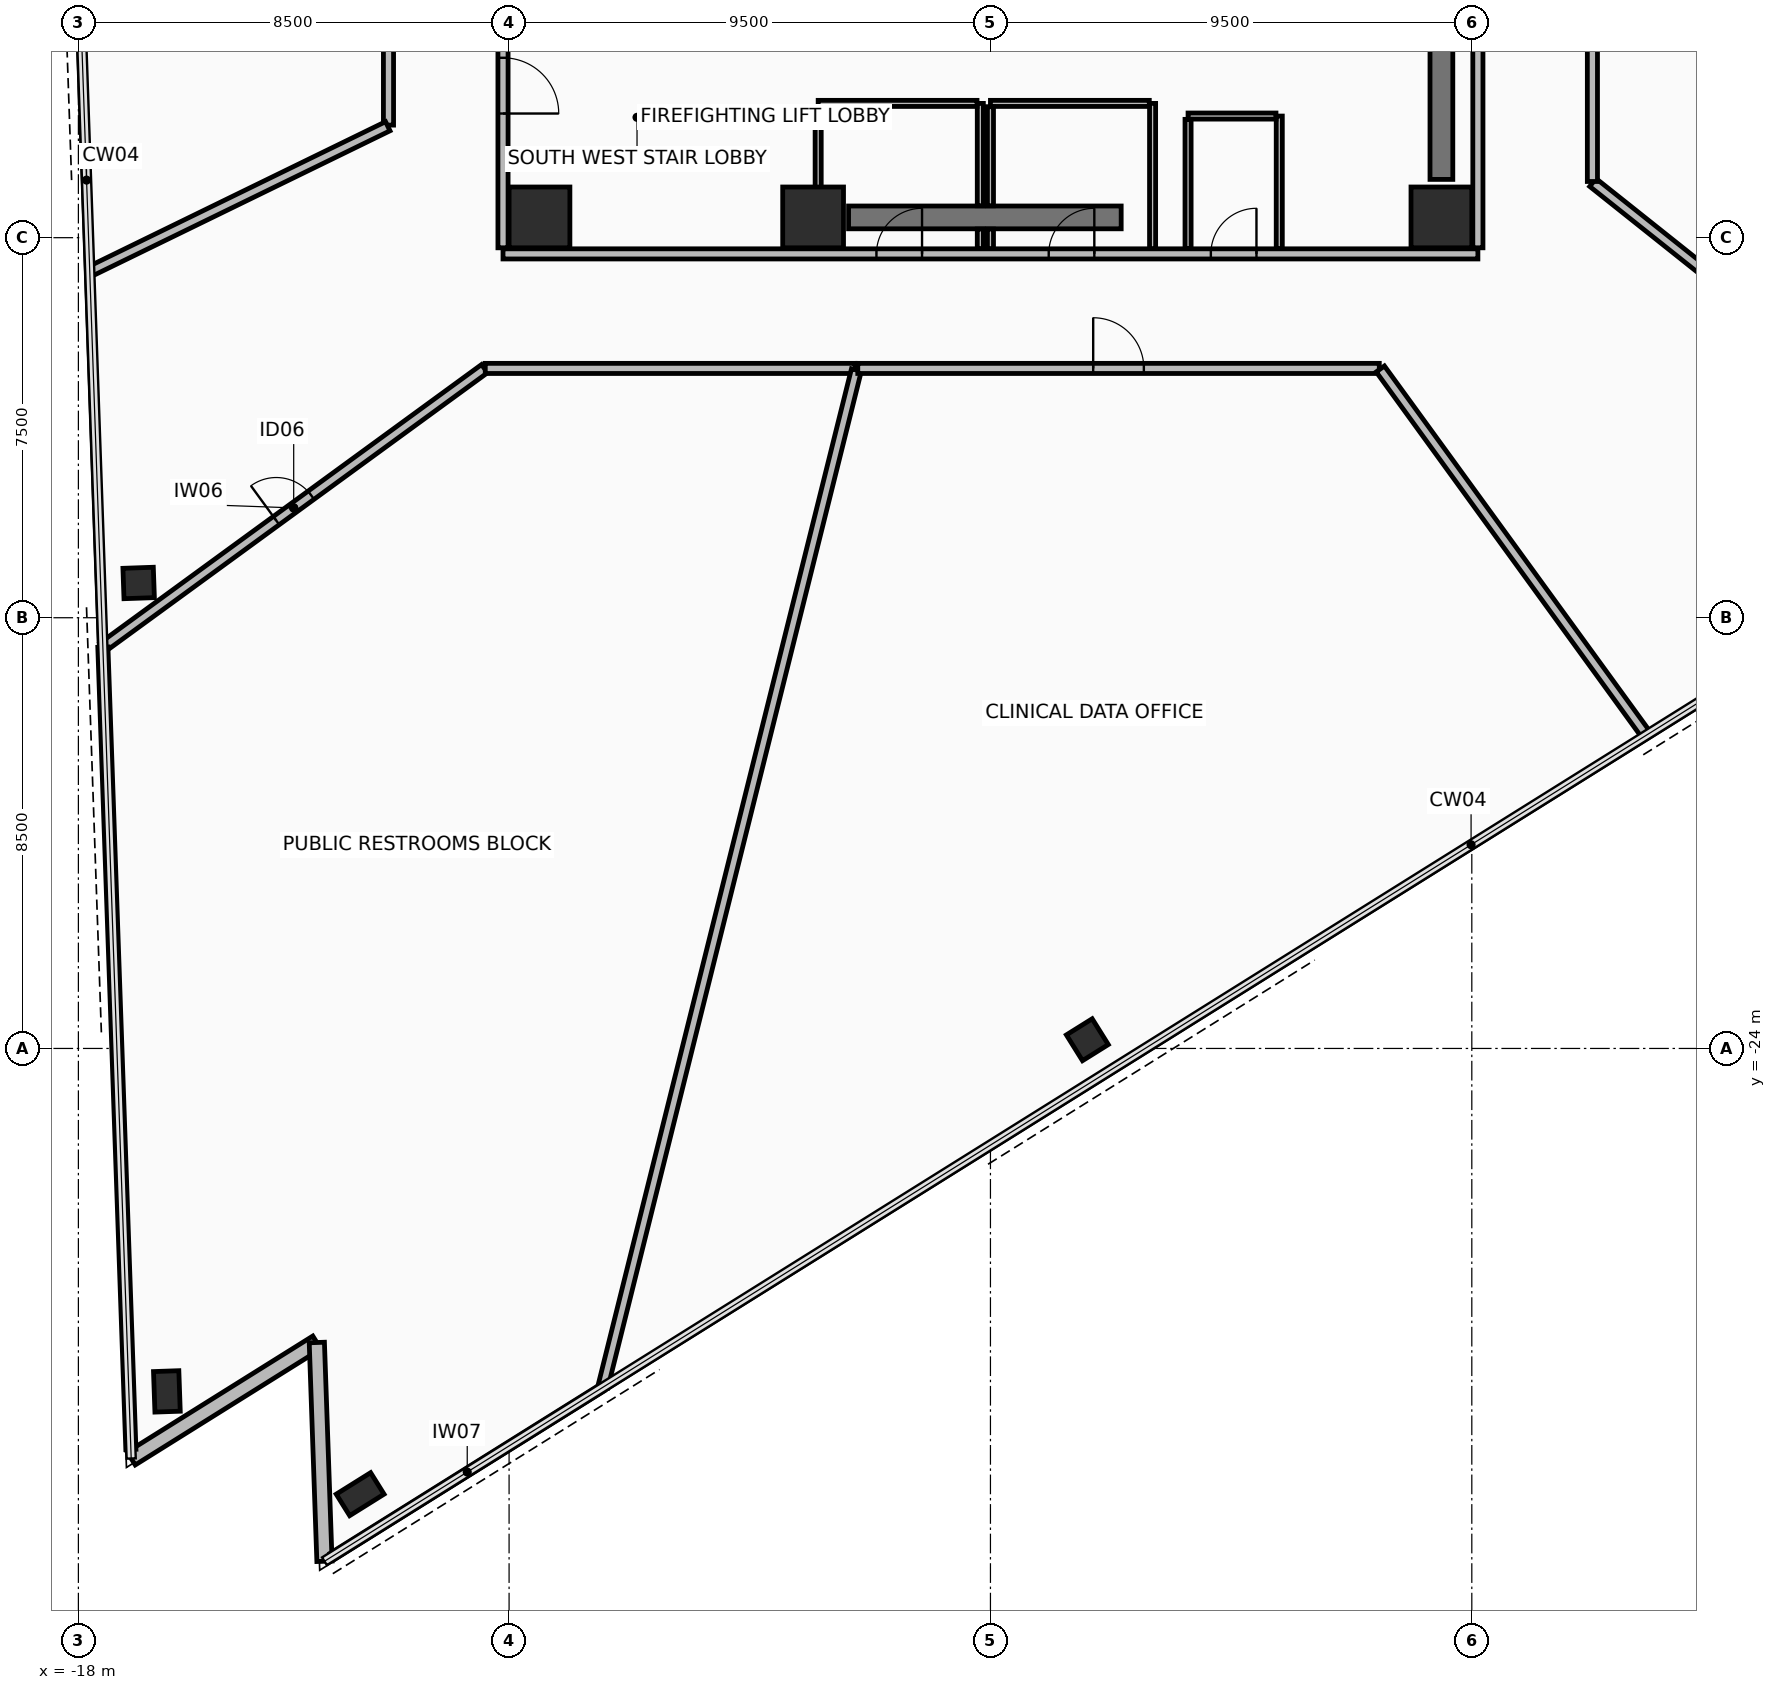
"""IFC4 building model, lengths in metres.
Left out: names, types, materials, properties, quantities, classifications, styles, units other than length and angle.
Written with IfcOpenShell. Run it as: python <this file> out.ifc"""

import sys

from ifc_helpers import new_model, si_unit, direction, frame, frame_2d, origin, origin_2d, place, context, subcontext, project, spatial, rectangle, hollow_rectangle, extrude, element, fill, save


model = new_model("IFC4")
c1 = context("Model", 3, precision=1e-05, world=origin(), true_north=direction((0.0, 1.0)))
c2 = subcontext(c1, "Body", "Model", "MODEL_VIEW")
j1 = project(units=[si_unit("LENGTHUNIT", "METRE"), si_unit("PLANEANGLEUNIT", "RADIAN")], contexts=[c1])
p1 = place(None, origin())
s1 = spatial("IfcSite", under=j1, at=p1, CompositionType="ELEMENT")
p2 = place(p1, origin())
s2 = spatial("IfcBuilding", under=s1, at=p2, CompositionType="ELEMENT")
p3 = place(p2, frame((0.0, 0.0, 156.8)))
s3 = spatial("IfcBuildingStorey", under=s2, at=p3, CompositionType="ELEMENT", Elevation=156.8)
for number, where, z_axis, x_axis in (
    (1, (-8.9, -7.6, 0.0), (0.0, 0.0, 1.0), (1.0, 0.0, 0.0)),
    (2, (-3.5, -7.6, 0.0), (0.0, 0.0, 1.0), (1.0, 0.0, 0.0)),
    (3, (8.9, -7.6, 0.0), (0.0, 0.0, 1.0), (1.0, 0.0, 0.0)),
):
    element("IfcColumn", number, at=place(p3, frame(where, z_axis=z_axis, x_axis=x_axis)), inside=s3, PredefinedType="COLUMN", context=c2, shape_type="SweptSolid", body=[
        extrude(rectangle(XDim=1.2, YDim=1.2, at=origin_2d()), origin(), (0.0, 0.0, 1.0), 3.6),
    ])
p4 = place(p3, frame((-16.811, -14.814, 0.0), z_axis=(0.0, 0.0, 1.0), x_axis=(-0.034899496703, 0.999390827019, 0.0)))
e4 = element("IfcColumn", 4, at=p4, inside=s3, PredefinedType="COLUMN", context=c2, shape_type="SweptSolid", body=[
    extrude(hollow_rectangle(XDim=0.6, YDim=0.6, WallThickness=0.036, at=origin_2d()), origin(), (0.0, 0.0, 1.0), 3.6),
])
for number, where, z_axis, x_axis in (
    (5, (-16.254, -30.768, 0.0), (0.0, 0.0, 1.0), (-0.035, 0.999, 0.0)),
    (6, (-12.439, -32.796, 0.0), (0.0, 0.0, 1.0), (0.848, 0.53, 0.0)),
):
    element("IfcColumn", number, at=place(p3, frame(where, z_axis=z_axis, x_axis=x_axis)), inside=s3, PredefinedType="COLUMN", context=c2, shape_type="SweptSolid", body=[
        extrude(hollow_rectangle(XDim=0.5, YDim=0.8, WallThickness=0.04, at=origin_2d()), origin(), (0.0, 0.0, 1.0), 3.6),
    ])
p5 = place(p3, frame((1.912, -23.828, 0.0), z_axis=(0.0, 0.0, 1.0), x_axis=(0.848047171272, 0.529920744356, 0.0)))
e7 = element("IfcColumn", 7, at=p5, inside=s3, PredefinedType="COLUMN", context=c2, shape_type="SweptSolid", body=[
    extrude(hollow_rectangle(XDim=0.6, YDim=0.6, WallThickness=0.036, at=origin_2d()), origin(), (0.0, 0.0, 1.0), 3.6),
])
p6 = place(p3, frame((-16.958, -32.092, 0.0), z_axis=(0.0, 0.0, 1.0), x_axis=(0.848068146975, 0.529887174866, 0.0)))
e8 = element("IfcWall", 8, at=p6, inside=s3, PredefinedType="STANDARD", context=c2, shape_type="SweptSolid", body=[
    extrude(rectangle(XDim=4.32, YDim=0.3, at=frame_2d((2.16, 0.0))), origin(), (0.0, 0.0, 1.0), 2.705),
])
p7 = place(p3, frame((-13.294, -29.803, 0.0), z_axis=(0.0, 0.0, 1.0), x_axis=(0.034869079132, -0.999391888761, 0.0)))
e9 = element("IfcWall", 9, at=p7, inside=s3, PredefinedType="STANDARD", context=c2, shape_type="SweptSolid", body=[
    extrude(rectangle(XDim=4.32, YDim=0.3, at=frame_2d((2.16, 0.0))), origin(), (0.0, 0.0, 1.0), 2.705),
])
p8 = place(p3, frame((-2.8, -7.6, 0.0), z_axis=(0.0, 0.0, 1.0), x_axis=(1.0, 0.0, 0.0)))
e10 = element("IfcWall", 10, at=p8, inside=s3, PredefinedType="SHEAR", context=c2, shape_type="SweptSolid", body=[
    extrude(rectangle(XDim=5.38, YDim=0.45, at=frame_2d((2.69, 0.0))), origin(), (0.0, 0.0, 1.0), 3.41),
])
p9 = place(p3, frame((8.9, -6.85, 0.0), z_axis=(0.0, 0.0, 1.0), x_axis=(0.0, 1.0, 0.0)))
e11 = element("IfcWall", 11, at=p9, inside=s3, PredefinedType="SHEAR", context=c2, shape_type="SweptSolid", body=[
    extrude(rectangle(XDim=10.7, YDim=0.45, at=frame_2d((5.35, 0.0))), origin(), (0.0, 0.0, 1.0), 3.41),
])
p10 = place(p3, frame((-9.62, -8.32, 0.0), z_axis=(0.0, 0.0, 1.0), x_axis=(1.0, 0.0, 0.0)))
e12 = element("IfcWall", 12, at=p10, inside=s3, PredefinedType="PARTITIONING", context=c2, shape_type="SweptSolid", body=[
    extrude(rectangle(XDim=19.24, YDim=0.2, at=frame_2d((9.62, 0.0))), origin(), (0.0, 0.0, 1.0), 2.855),
])
p11 = place(p10, frame((7.37, 0.0, 0.0)))
e13 = element("IfcOpeningElement", 13, at=p11, cuts=e12, PredefinedType="OPENING", context=c2, shape_type="SweptSolid", body=[
    extrude(rectangle(XDim=0.9, YDim=2.1, at=frame_2d((0.45, 1.05))), frame((0.0, 0.11, 0.0), z_axis=(0.0, -1.0, 0.0), x_axis=(1.0, 0.0, 0.0)), (0.0, 0.0, 1.0), 0.22),
])
p12 = place(p10, frame((10.77, 0.0, 0.0)))
e14 = element("IfcOpeningElement", 14, at=p12, cuts=e12, PredefinedType="OPENING", context=c2, shape_type="SweptSolid", body=[
    extrude(rectangle(XDim=0.9, YDim=2.1, at=frame_2d((0.45, 1.05))), frame((0.0, 0.11, 0.0), z_axis=(0.0, -1.0, 0.0), x_axis=(1.0, 0.0, 0.0)), (0.0, 0.0, 1.0), 0.22),
])
p13 = place(p10, frame((13.97, 0.0, 0.0)))
e15 = element("IfcOpeningElement", 15, at=p13, cuts=e12, PredefinedType="OPENING", context=c2, shape_type="SweptSolid", body=[
    extrude(rectangle(XDim=0.9, YDim=2.1, at=frame_2d((0.45, 1.05))), frame((0.0, 0.11, 0.0), z_axis=(0.0, -1.0, 0.0), x_axis=(1.0, 0.0, 0.0)), (0.0, 0.0, 1.0), 0.22),
])
p14 = place(p3, frame((-9.62, 8.2, 0.0), z_axis=(0.0, 0.0, 1.0), x_axis=(0.0, -1.0, 0.0)))
e16 = element("IfcWall", 16, at=p14, inside=s3, PredefinedType="PARTITIONING", context=c2, shape_type="SweptSolid", body=[
    extrude(rectangle(XDim=16.4, YDim=0.2, at=frame_2d((8.2, 0.0))), origin(), (0.0, 0.0, 1.0), 2.855),
])
p15 = place(p14, frame((12.65, 0.0, 0.0)))
e17 = element("IfcOpeningElement", 17, at=p15, cuts=e16, PredefinedType="OPENING", context=c2, shape_type="SweptSolid", body=[
    extrude(rectangle(XDim=1.1, YDim=2.15, at=frame_2d((0.55, 1.075))), frame((0.0, 0.11, 0.0), z_axis=(0.0, -1.0, 0.0), x_axis=(1.0, 0.0, 0.0)), (0.0, 0.0, 1.0), 0.22),
])
p16 = place(p3, frame((9.62, -8.2, 0.0), z_axis=(0.0, 0.0, 1.0), x_axis=(0.0, 1.0, 0.0)))
e18 = element("IfcWall", 18, at=p16, inside=s3, PredefinedType="PARTITIONING", context=c2, shape_type="SweptSolid", body=[
    extrude(rectangle(XDim=16.4, YDim=0.2, at=frame_2d((8.2, 0.0))), origin(), (0.0, 0.0, 1.0), 2.855),
])
p17 = place(p16, frame((12.65, 0.0, 0.0)))
e19 = element("IfcOpeningElement", 19, at=p17, cuts=e18, PredefinedType="OPENING", context=c2, shape_type="SweptSolid", body=[
    extrude(rectangle(XDim=1.1, YDim=2.15, at=frame_2d((0.55, 1.075))), frame((0.0, 0.11, 0.0), z_axis=(0.0, -1.0, 0.0), x_axis=(1.0, 0.0, 0.0)), (0.0, 0.0, 1.0), 0.22),
])
p18 = place(p3, frame((-0.2, -8.215, 0.0), z_axis=(0.0, 0.0, 1.0), x_axis=(0.0, 1.0, 0.0)))
e20 = element("IfcWall", 20, at=p18, inside=s3, PredefinedType="PARTITIONING", context=c2, shape_type="SweptSolid", body=[
    extrude(rectangle(XDim=0.385, YDim=0.12, at=frame_2d((0.192, 0.0))), origin(), (0.0, 0.0, 1.0), 2.605),
])
p19 = place(p3, frame((-0.2, -7.37, 0.0), z_axis=(0.0, 0.0, 1.0), x_axis=(0.0, 1.0, 0.0)))
e21 = element("IfcWall", 21, at=p19, inside=s3, PredefinedType="PARTITIONING", context=c2, shape_type="SweptSolid", body=[
    extrude(rectangle(XDim=2.02, YDim=0.12, at=frame_2d((1.01, 0.0))), origin(), (0.0, 0.0, 1.0), 2.605),
])
p20 = place(p3, frame((-0.265, -5.35, 0.0), z_axis=(0.0, 0.0, 1.0), x_axis=(-1.0, 0.0, 0.0)))
e22 = element("IfcWall", 22, at=p20, inside=s3, PredefinedType="PARTITIONING", context=c2, shape_type="SweptSolid", body=[
    extrude(rectangle(XDim=3.135, YDim=0.12, at=frame_2d((1.567, 0.0))), origin(), (0.0, 0.0, 1.0), 2.605),
])
p21 = place(p3, frame((-3.4, -5.415, 0.0), z_axis=(0.0, 0.0, 1.0), x_axis=(0.0, -1.0, 0.0)))
e23 = element("IfcWall", 23, at=p21, inside=s3, PredefinedType="PARTITIONING", context=c2, shape_type="SweptSolid", body=[
    extrude(rectangle(XDim=2.8, YDim=0.12, at=frame_2d((1.4, 0.0))), origin(), (0.0, 0.0, 1.0), 2.605),
])
p22 = place(p3, frame((3.2, -8.215, 0.0), z_axis=(0.0, 0.0, 1.0), x_axis=(0.0, 1.0, 0.0)))
e24 = element("IfcWall", 24, at=p22, inside=s3, PredefinedType="PARTITIONING", context=c2, shape_type="SweptSolid", body=[
    extrude(rectangle(XDim=2.865, YDim=0.12, at=frame_2d((1.433, 0.0))), origin(), (0.0, 0.0, 1.0), 2.605),
])
p23 = place(p3, frame((3.135, -5.35, 0.0), z_axis=(0.0, 0.0, 1.0), x_axis=(-1.0, 0.0, 0.0)))
e25 = element("IfcWall", 25, at=p23, inside=s3, PredefinedType="PARTITIONING", context=c2, shape_type="SweptSolid", body=[
    extrude(rectangle(XDim=3.135, YDim=0.12, at=frame_2d((1.567, 0.0))), origin(), (0.0, 0.0, 1.0), 3.41),
])
p24 = place(p3, frame((0.0, -5.415, 0.0), z_axis=(0.0, 0.0, 1.0), x_axis=(0.0, -1.0, 0.0)))
e26 = element("IfcWall", 26, at=p24, inside=s3, PredefinedType="PARTITIONING", context=c2, shape_type="SweptSolid", body=[
    extrude(rectangle(XDim=1.955, YDim=0.12, at=frame_2d((0.978, 0.0))), origin(), (0.0, 0.0, 1.0), 2.605),
])
p25 = place(p3, frame((0.0, -7.83, 0.0), z_axis=(0.0, 0.0, 1.0), x_axis=(0.0, -1.0, 0.0)))
e27 = element("IfcWall", 27, at=p25, inside=s3, PredefinedType="PARTITIONING", context=c2, shape_type="SweptSolid", body=[
    extrude(rectangle(XDim=0.385, YDim=0.12, at=frame_2d((0.192, 0.0))), origin(), (0.0, 0.0, 1.0), 2.605),
])
p26 = place(p3, frame((5.7, -8.215, 0.0), z_axis=(0.0, 0.0, 1.0), x_axis=(0.0, 1.0, 0.0)))
e28 = element("IfcWall", 28, at=p26, inside=s3, PredefinedType="PARTITIONING", context=c2, shape_type="SweptSolid", body=[
    extrude(rectangle(XDim=2.615, YDim=0.12, at=frame_2d((1.308, 0.0))), origin(), (0.0, 0.0, 1.0), 2.605),
])
p27 = place(p3, frame((5.635, -5.6, 0.0), z_axis=(0.0, 0.0, 1.0), x_axis=(-1.0, 0.0, 0.0)))
e29 = element("IfcWall", 29, at=p27, inside=s3, PredefinedType="PARTITIONING", context=c2, shape_type="SweptSolid", body=[
    extrude(rectangle(XDim=1.735, YDim=0.12, at=frame_2d((0.868, 0.0))), origin(), (0.0, 0.0, 1.0), 3.41),
])
p28 = place(p3, frame((3.9, -5.665, 0.0), z_axis=(0.0, 0.0, 1.0), x_axis=(0.0, -1.0, 0.0)))
e30 = element("IfcWall", 30, at=p28, inside=s3, PredefinedType="PARTITIONING", context=c2, shape_type="SweptSolid", body=[
    extrude(rectangle(XDim=2.55, YDim=0.12, at=frame_2d((1.275, 0.0))), origin(), (0.0, 0.0, 1.0), 2.605),
])
p29 = place(p3, frame((-17.517, -16.08, 0.0), z_axis=(0.0, 0.0, 1.0), x_axis=(0.807836100195, 0.58940718966, 0.0)))
e31 = element("IfcWall", 31, at=p29, inside=s3, PredefinedType="PARTITIONING", context=c2, shape_type="SweptSolid", body=[
    extrude(rectangle(XDim=9.324, YDim=0.2, at=frame_2d((4.662, 0.0))), origin(), (0.0, 0.0, 1.0), 2.705),
])
p30 = place(p29, frame((4.237, 0.0, 0.0)))
e32 = element("IfcOpeningElement", 32, at=p30, cuts=e31, PredefinedType="OPENING", context=c2, shape_type="SweptSolid", body=[
    extrude(rectangle(XDim=0.85, YDim=2.1, at=frame_2d((0.425, 1.05))), frame((0.0, 0.11, 0.0), z_axis=(0.0, -1.0, 0.0), x_axis=(1.0, 0.0, 0.0)), (0.0, 0.0, 1.0), 0.22),
])
p31 = place(p3, frame((-9.97, -10.58, 0.0), z_axis=(0.0, 0.0, 1.0), x_axis=(1.0, 0.0, 0.0)))
e33 = element("IfcWall", 33, at=p31, inside=s3, PredefinedType="PARTITIONING", context=c2, shape_type="SweptSolid", body=[
    extrude(rectangle(XDim=7.3, YDim=0.2, at=frame_2d((3.65, 0.0))), origin(), (0.0, 0.0, 1.0), 2.855),
])
p32 = place(p3, frame((-2.646, -10.611, 0.0), z_axis=(0.0, 0.0, 1.0), x_axis=(-0.241932855274, -0.970292993656, 0.0)))
e34 = element("IfcWall", 34, at=p32, inside=s3, PredefinedType="PARTITIONING", context=c2, shape_type="SweptSolid", body=[
    extrude(rectangle(XDim=20.682, YDim=0.2, at=frame_2d((10.341, 0.0))), origin(), (0.0, 0.0, 1.0), 2.705),
])
p33 = place(p3, frame((-7.66, -30.694, 0.0), z_axis=(0.0, 0.0, 1.0), x_axis=(-0.848046297007, -0.529922143463, 0.0)))
e35 = element("IfcWall", 35, at=p33, inside=s3, PredefinedType="PARTITIONING", context=c2, shape_type="SweptSolid", body=[
    extrude(rectangle(XDim=6.287, YDim=0.15, at=frame_2d((3.144, 0.0))), origin(), (0.0, 0.0, 1.0), 3.41),
])
p34 = place(p3, frame((-16.964, -31.913, 0.0), z_axis=(0.0, 0.0, 1.0), x_axis=(-0.034889540938, 0.999391174632, 0.0)))
e36 = element("IfcWall", 36, at=p34, inside=s3, PredefinedType="PARTITIONING", context=c2, shape_type="SweptSolid", body=[
    extrude(rectangle(XDim=15.843, YDim=0.2, at=frame_2d((7.921, 0.0))), origin(), (0.0, 0.0, 1.0), 3.41),
])
p35 = place(p3, frame((20.03, -13.391, 0.0), z_axis=(0.0, 0.0, 1.0), x_axis=(-0.782379652936, 0.622801797261, 0.0)))
e37 = element("IfcWall", 37, at=p35, inside=s3, PredefinedType="PARTITIONING", context=c2, shape_type="SweptSolid", body=[
    extrude(rectangle(XDim=10.405, YDim=0.2, at=frame_2d((5.203, 0.0))), origin(), (0.0, 0.0, 1.0), 2.705),
])
p36 = place(p35, frame((4.777, 0.0, 0.0)))
e38 = element("IfcOpeningElement", 38, at=p36, cuts=e37, PredefinedType="OPENING", context=c2, shape_type="SweptSolid", body=[
    extrude(rectangle(XDim=0.85, YDim=2.1, at=frame_2d((0.425, 1.05))), frame((0.0, 0.11, 0.0), z_axis=(0.0, -1.0, 0.0), x_axis=(1.0, 0.0, 0.0)), (0.0, 0.0, 1.0), 0.22),
])
p37 = place(p3, frame((11.88, -6.891, 0.0), z_axis=(0.0, 0.0, 1.0), x_axis=(0.0, 1.0, 0.0)))
e39 = element("IfcWall", 39, at=p37, inside=s3, PredefinedType="PARTITIONING", context=c2, shape_type="SweptSolid", body=[
    extrude(rectangle(XDim=6.034, YDim=0.2, at=frame_2d((3.017, 0.0))), origin(), (0.0, 0.0, 1.0), 2.855),
])
p38 = place(p3, frame((-11.88, 5.273, 0.0), z_axis=(0.0, 0.0, 1.0), x_axis=(0.0, -1.0, 0.0)))
e40 = element("IfcWall", 40, at=p38, inside=s3, PredefinedType="PARTITIONING", context=c2, shape_type="SweptSolid", body=[
    extrude(rectangle(XDim=11.052, YDim=0.2, at=frame_2d((5.526, 0.0))), origin(), (0.0, 0.0, 1.0), 2.855),
])
p39 = place(p38, frame((4.926, 0.0, 0.0)))
e41 = element("IfcOpeningElement", 41, at=p39, cuts=e40, PredefinedType="OPENING", context=c2, shape_type="SweptSolid", body=[
    extrude(rectangle(XDim=1.2, YDim=2.15, at=frame_2d((0.6, 1.075))), frame((0.0, 0.11, 0.0), z_axis=(0.0, -1.0, 0.0), x_axis=(1.0, 0.0, 0.0)), (0.0, 0.0, 1.0), 0.22),
])
p40 = place(p3, frame((-11.894, -5.801, 0.0), z_axis=(0.0, 0.0, 1.0), x_axis=(-0.89877884349, -0.438402315796, 0.0)))
e42 = element("IfcWall", 42, at=p40, inside=s3, PredefinedType="PARTITIONING", context=c2, shape_type="SweptSolid", body=[
    extrude(rectangle(XDim=6.544, YDim=0.2, at=frame_2d((3.272, 0.0))), origin(), (0.0, 0.0, 1.0), 2.705),
])
p41 = place(p3, frame((-2.618, -10.58, 0.0), z_axis=(0.0, 0.0, 1.0), x_axis=(1.0, 0.0, 0.0)))
e43 = element("IfcWall", 43, at=p41, inside=s3, PredefinedType="PARTITIONING", context=c2, shape_type="SweptSolid", body=[
    extrude(rectangle(XDim=10.292, YDim=0.2, at=frame_2d((5.146, 0.0))), origin(), (0.0, 0.0, 1.0), 2.855),
])
p42 = place(p41, frame((4.646, 0.0, 0.0)))
e44 = element("IfcOpeningElement", 44, at=p42, cuts=e43, PredefinedType="OPENING", context=c2, shape_type="SweptSolid", body=[
    extrude(rectangle(XDim=1.0, YDim=2.15, at=frame_2d((0.5, 1.075))), frame((0.0, 0.11, 0.0), z_axis=(0.0, -1.0, 0.0), x_axis=(1.0, 0.0, 0.0)), (0.0, 0.0, 1.0), 0.22),
])
p43 = place(p3, frame((7.694, -10.59, 0.0), z_axis=(0.0, 0.0, 1.0), x_axis=(0.587773963439, -0.809025196086, 0.0)))
e45 = element("IfcWall", 45, at=p43, inside=s3, PredefinedType="PARTITIONING", context=c2, shape_type="SweptSolid", body=[
    extrude(rectangle(XDim=8.907, YDim=0.2, at=frame_2d((4.454, 0.0))), origin(), (0.0, 0.0, 1.0), 2.705),
])
p44 = place(p15, frame((1.1, 0.0, 0.0), z_axis=(0.0, 0.0, 1.0), x_axis=(-1.0, 0.0, 0.0)))
e46 = element("IfcDoor", 46, at=p44, inside=s3, OperationType="SINGLE_SWING_LEFT", PredefinedType="DOOR", context=c2, shape_type="SweptSolid", body=[
    extrude(rectangle(XDim=1.1, YDim=2.15, at=frame_2d((0.55, 1.075))), frame((0.0, 0.025, 0.0), z_axis=(0.0, -1.0, 0.0), x_axis=(1.0, 0.0, 0.0)), (0.0, 0.0, 1.0), 0.05),
])
fill(e17, e46)
p45 = place(p11, frame((0.9, 0.0, 0.0), z_axis=(0.0, 0.0, 1.0), x_axis=(-1.0, 0.0, 0.0)))
e47 = element("IfcDoor", 47, at=p45, inside=s3, OperationType="SINGLE_SWING_LEFT", PredefinedType="DOOR", context=c2, shape_type="SweptSolid", body=[
    extrude(rectangle(XDim=0.9, YDim=2.1, at=frame_2d((0.45, 1.05))), frame((0.0, 0.025, 0.0), z_axis=(0.0, -1.0, 0.0), x_axis=(1.0, 0.0, 0.0)), (0.0, 0.0, 1.0), 0.05),
])
fill(e13, e47)
p46 = place(p12, frame((0.9, 0.0, 0.0), z_axis=(0.0, 0.0, 1.0), x_axis=(-1.0, 0.0, 0.0)))
e48 = element("IfcDoor", 48, at=p46, inside=s3, OperationType="SINGLE_SWING_LEFT", PredefinedType="DOOR", context=c2, shape_type="SweptSolid", body=[
    extrude(rectangle(XDim=0.9, YDim=2.1, at=frame_2d((0.45, 1.05))), frame((0.0, 0.025, 0.0), z_axis=(0.0, -1.0, 0.0), x_axis=(1.0, 0.0, 0.0)), (0.0, 0.0, 1.0), 0.05),
])
fill(e14, e48)
p47 = place(p13, frame((0.9, 0.0, 0.0), z_axis=(0.0, 0.0, 1.0), x_axis=(-1.0, 0.0, 0.0)))
e49 = element("IfcDoor", 49, at=p47, inside=s3, OperationType="SINGLE_SWING_LEFT", PredefinedType="DOOR", context=c2, shape_type="SweptSolid", body=[
    extrude(rectangle(XDim=0.9, YDim=2.1, at=frame_2d((0.45, 1.05))), frame((0.0, 0.025, 0.0), z_axis=(0.0, -1.0, 0.0), x_axis=(1.0, 0.0, 0.0)), (0.0, 0.0, 1.0), 0.05),
])
fill(e15, e49)
p48 = place(p30, origin())
e50 = element("IfcDoor", 50, at=p48, inside=s3, OperationType="SINGLE_SWING_RIGHT", PredefinedType="DOOR", context=c2, shape_type="SweptSolid", body=[
    extrude(rectangle(XDim=0.85, YDim=2.1, at=frame_2d((0.425, 1.05))), frame((0.0, 0.025, 0.0), z_axis=(0.0, -1.0, 0.0), x_axis=(1.0, 0.0, 0.0)), (0.0, 0.0, 1.0), 0.05),
])
fill(e32, e50)
p49 = place(p42, origin())
e51 = element("IfcDoor", 51, at=p49, inside=s3, OperationType="SINGLE_SWING_RIGHT", PredefinedType="DOOR", context=c2, shape_type="SweptSolid", body=[
    extrude(rectangle(XDim=1.0, YDim=2.15, at=frame_2d((0.5, 1.075))), frame((0.0, 0.025, 0.0), z_axis=(0.0, -1.0, 0.0), x_axis=(1.0, 0.0, 0.0)), (0.0, 0.0, 1.0), 0.05),
])
fill(e44, e51)
save(model, sys.argv[1])
